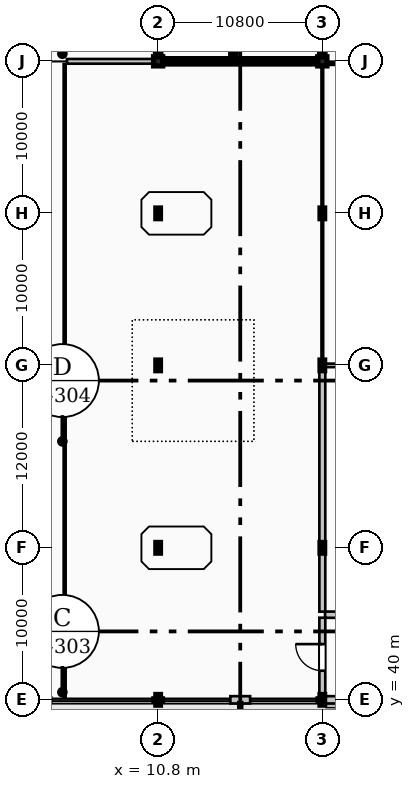
"""IFC4 building model, lengths in metres.
Left out: names, types, materials, properties, quantities, classifications, styles, units other than length and angle.
Written with IfcOpenShell. Run it as: python <this file> out.ifc"""

import sys

from ifc_helpers import new_model, si_unit, direction, frame, frame_2d, origin, origin_2d, place, context, subcontext, project, spatial, rectangle, i_section, extrude, element, fill, save


model = new_model("IFC4")
c1 = context("Model", 3, precision=1e-05, world=origin(), true_north=direction((0.0, 1.0)))
c2 = subcontext(c1, "Body", "Model", "MODEL_VIEW")
j1 = project(units=[si_unit("LENGTHUNIT", "METRE"), si_unit("PLANEANGLEUNIT", "RADIAN")], contexts=[c1])
p1 = place(None, origin())
s1 = spatial("IfcSite", under=j1, at=p1, CompositionType="ELEMENT")
p2 = place(p1, origin())
s2 = spatial("IfcBuilding", under=s1, at=p2, CompositionType="ELEMENT")
p3 = place(p2, frame((0.0, 0.0, 9.6)))
s3 = spatial("IfcBuildingStorey", under=s2, at=p3, CompositionType="ELEMENT", Elevation=9.6)
for number, where, z_axis, x_axis in (
    (1, (10.8, 40.0, 0.0), (0.0, 0.0, 1.0), (1.0, 0.0, 0.0)),
    (2, (10.8, 50.0, 0.0), (0.0, 0.0, 1.0), (1.0, 0.0, 0.0)),
    (3, (10.8, 62.0, 0.0), (0.0, 0.0, 1.0), (1.0, 0.0, 0.0)),
    (4, (10.8, 72.0, 0.0), (0.0, 0.0, 1.0), (1.0, 0.0, 0.0)),
):
    element("IfcColumn", number, at=place(p3, frame(where, z_axis=z_axis, x_axis=x_axis)), inside=s3, PredefinedType="COLUMN", context=c2, shape_type="SweptSolid", body=[
        extrude(i_section(OverallWidth=0.3, OverallDepth=0.7, WebThickness=0.017, FlangeThickness=0.032, FilletRadius=0.027, at=origin_2d()), origin(), (0.0, 0.0, 1.0), 4.8),
    ])
p4 = place(p3, frame((10.8, 82.0, 0.0), z_axis=(0.0, 0.0, 1.0), x_axis=(1.0, 0.0, 0.0)))
e5 = element("IfcColumn", 5, at=p4, inside=s3, PredefinedType="COLUMN", context=c2, shape_type="SweptSolid", body=[
    extrude(rectangle(XDim=0.6, YDim=0.6, at=origin_2d()), origin(), (0.0, 0.0, 1.0), 4.8),
])
for number, where, z_axis, x_axis in (
    (6, (21.6, 40.0, 0.0), (0.0, 0.0, 1.0), (1.0, 0.0, 0.0)),
    (7, (21.6, 50.0, 0.0), (0.0, 0.0, 1.0), (1.0, 0.0, 0.0)),
    (8, (21.6, 62.0, 0.0), (0.0, 0.0, 1.0), (1.0, 0.0, 0.0)),
    (9, (21.6, 72.0, 0.0), (0.0, 0.0, 1.0), (1.0, 0.0, 0.0)),
):
    element("IfcColumn", number, at=place(p3, frame(where, z_axis=z_axis, x_axis=x_axis)), inside=s3, PredefinedType="COLUMN", context=c2, shape_type="SweptSolid", body=[
        extrude(i_section(OverallWidth=0.3, OverallDepth=0.7, WebThickness=0.017, FlangeThickness=0.032, FilletRadius=0.027, at=origin_2d()), origin(), (0.0, 0.0, 1.0), 4.8),
    ])
p5 = place(p3, frame((21.6, 82.0, 0.0), z_axis=(0.0, 0.0, 1.0), x_axis=(1.0, 0.0, 0.0)))
e10 = element("IfcColumn", 10, at=p5, inside=s3, PredefinedType="COLUMN", context=c2, shape_type="SweptSolid", body=[
    extrude(rectangle(XDim=0.6, YDim=0.6, at=origin_2d()), origin(), (0.0, 0.0, 1.0), 4.8),
])
p6 = place(p3, frame((10.43, 40.0, 0.0), z_axis=(0.0, 0.0, 1.0), x_axis=(1.0, 0.0, 0.0)))
e11 = element("IfcWall", 11, at=p6, inside=s3, PredefinedType="STANDARD", context=c2, shape_type="SweptSolid", body=[
    extrude(rectangle(XDim=0.225, YDim=0.3, at=frame_2d((0.113, 0.0))), origin(), (0.0, 0.0, 1.0), 4.56),
])
p7 = place(p3, frame((15.55, 40.0, 0.0), z_axis=(0.0, 0.0, 1.0), x_axis=(1.0, 0.0, 0.0)))
e12 = element("IfcWall", 12, at=p7, inside=s3, PredefinedType="STANDARD", context=c2, shape_type="SweptSolid", body=[
    extrude(rectangle(XDim=1.3, YDim=0.48, at=frame_2d((0.65, 0.0))), origin(), (0.0, 0.0, 1.0), 3.94),
])
p8 = place(p3, frame((10.945, 40.0, 0.0), z_axis=(0.0, 0.0, 1.0), x_axis=(1.0, 0.0, 0.0)))
e13 = element("IfcWall", 13, at=p8, inside=s3, PredefinedType="STANDARD", context=c2, shape_type="SweptSolid", body=[
    extrude(rectangle(XDim=0.225, YDim=0.3, at=frame_2d((0.112, 0.0))), origin(), (0.0, 0.0, 1.0), 4.56),
])
p9 = place(p3, frame((21.23, 40.0, 0.0), z_axis=(0.0, 0.0, 1.0), x_axis=(1.0, 0.0, 0.0)))
e14 = element("IfcWall", 14, at=p9, inside=s3, PredefinedType="STANDARD", context=c2, shape_type="SweptSolid", body=[
    extrude(rectangle(XDim=0.225, YDim=0.3, at=frame_2d((0.113, 0.0))), origin(), (0.0, 0.0, 1.0), 4.56),
])
p10 = place(p3, frame((21.745, 40.0, 0.0), z_axis=(0.0, 0.0, 1.0), x_axis=(1.0, 0.0, 0.0)))
e15 = element("IfcWall", 15, at=p10, inside=s3, PredefinedType="STANDARD", context=c2, shape_type="SweptSolid", body=[
    extrude(rectangle(XDim=10.51, YDim=0.48, at=frame_2d((5.255, 0.0))), origin(), (0.0, 0.0, 1.0), 3.94),
])
p11 = place(p3, frame((11.1, 82.0, 0.0), z_axis=(0.0, 0.0, 1.0), x_axis=(1.0, 0.0, 0.0)))
e16 = element("IfcWall", 16, at=p11, inside=s3, PredefinedType="SHEAR", context=c2, shape_type="SweptSolid", body=[
    extrude(rectangle(XDim=10.2, YDim=0.35, at=frame_2d((5.1, 0.0))), origin(), (0.0, 0.0, 1.0), 4.56),
])
p12 = place(p3, frame((10.8, 82.3, 0.0), z_axis=(0.0, 0.0, 1.0), x_axis=(0.0, 1.0, 0.0)))
e17 = element("IfcWall", 17, at=p12, inside=s3, PredefinedType="SHEAR", context=c2, shape_type="SweptSolid", body=[
    extrude(rectangle(XDim=9.4, YDim=0.35, at=frame_2d((4.7, 0.0))), origin(), (0.0, 0.0, 1.0), 4.56),
])
p13 = place(p3, frame((21.6, 82.3, 0.0), z_axis=(0.0, 0.0, 1.0), x_axis=(0.0, 1.0, 0.0)))
e18 = element("IfcWall", 18, at=p13, inside=s3, PredefinedType="SHEAR", context=c2, shape_type="SweptSolid", body=[
    extrude(rectangle(XDim=9.4, YDim=0.35, at=frame_2d((4.7, 0.0))), origin(), (0.0, 0.0, 1.0), 4.56),
])
p14 = place(p13, frame((0.88, 0.0, 0.0)))
e19 = element("IfcOpeningElement", 19, at=p14, cuts=e18, PredefinedType="OPENING", context=c2, shape_type="SweptSolid", body=[
    extrude(rectangle(XDim=1.8, YDim=2.25, at=frame_2d((0.9, 1.125))), frame((0.0, 0.185, 0.0), z_axis=(0.0, -1.0, 0.0), x_axis=(1.0, 0.0, 0.0)), (0.0, 0.0, 1.0), 0.37),
])
p15 = place(p3, frame((15.75, 82.175, 0.0), z_axis=(0.0, 0.0, 1.0), x_axis=(0.0, 1.0, 0.0)))
e20 = element("IfcWall", 20, at=p15, inside=s3, PredefinedType="SHEAR", context=c2, shape_type="SweptSolid", body=[
    extrude(rectangle(XDim=9.65, YDim=0.35, at=frame_2d((4.825, 0.0))), origin(), (0.0, 0.0, 1.0), 4.56),
])
p16 = place(p15, frame((0.9, 0.0, 0.0)))
e21 = element("IfcOpeningElement", 21, at=p16, cuts=e20, PredefinedType="OPENING", context=c2, shape_type="SweptSolid", body=[
    extrude(rectangle(XDim=1.1, YDim=2.2, at=frame_2d((0.55, 1.1))), frame((0.0, 0.185, 0.0), z_axis=(0.0, -1.0, 0.0), x_axis=(1.0, 0.0, 0.0)), (0.0, 0.0, 1.0), 0.37),
])
p17 = place(p3, frame((21.78, 45.6, 0.0), z_axis=(0.0, 0.0, 1.0), x_axis=(1.0, 0.0, 0.0)))
e22 = element("IfcWall", 22, at=p17, inside=s3, PredefinedType="PARTITIONING", context=c2, shape_type="SweptSolid", body=[
    extrude(rectangle(XDim=11.22, YDim=0.41, at=frame_2d((5.61, 0.0))), origin(), (0.0, 0.0, 1.0), 4.52),
])
p18 = place(p17, frame((5.1, 0.0, 0.0)))
e23 = element("IfcOpeningElement", 23, at=p18, cuts=e22, PredefinedType="OPENING", context=c2, shape_type="SweptSolid", body=[
    extrude(rectangle(XDim=1.02, YDim=2.1, at=frame_2d((0.51, 1.05))), frame((0.0, 0.215, 0.0), z_axis=(0.0, -1.0, 0.0), x_axis=(1.0, 0.0, 0.0)), (0.0, 0.0, 1.0), 0.43),
])
p19 = place(p3, frame((21.78, 81.85, 0.0), z_axis=(0.0, 0.0, 1.0), x_axis=(1.0, 0.0, 0.0)))
e24 = element("IfcWall", 24, at=p19, inside=s3, PredefinedType="PARTITIONING", context=c2, shape_type="SweptSolid", body=[
    extrude(rectangle(XDim=10.42, YDim=0.17, at=frame_2d((5.21, 0.0))), origin(), (0.0, 0.0, 1.0), 3.94),
])
p20 = place(p3, frame((21.6, 40.18, 0.0), z_axis=(0.0, 0.0, 1.0), x_axis=(0.0, 1.0, 0.0)))
e25 = element("IfcWall", 25, at=p20, inside=s3, PredefinedType="PARTITIONING", context=c2, shape_type="SweptSolid", body=[
    extrude(rectangle(XDim=5.22, YDim=0.39, at=frame_2d((2.61, 0.0))), origin(), (0.0, 0.0, 1.0), 4.039),
])
p21 = place(p20, frame((1.735, 0.0, 0.0)))
e26 = element("IfcOpeningElement", 26, at=p21, cuts=e25, PredefinedType="OPENING", context=c2, shape_type="SweptSolid", body=[
    extrude(rectangle(XDim=1.75, YDim=2.45, at=frame_2d((0.875, 1.225))), frame((0.0, 0.205, 0.0), z_axis=(0.0, -1.0, 0.0), x_axis=(1.0, 0.0, 0.0)), (0.0, 0.0, 1.0), 0.41),
])
p22 = place(p3, frame((21.78, 62.0, 0.0), z_axis=(0.0, 0.0, 1.0), x_axis=(1.0, 0.0, 0.0)))
e27 = element("IfcWall", 27, at=p22, inside=s3, PredefinedType="PARTITIONING", context=c2, shape_type="SweptSolid", body=[
    extrude(rectangle(XDim=10.42, YDim=0.23, at=frame_2d((5.21, 0.0))), origin(), (0.0, 0.0, 1.0), 3.94),
])
p23 = place(p3, frame((4.8, 82.0, 0.0), z_axis=(0.0, 0.0, 1.0), x_axis=(1.0, 0.0, 0.0)))
e28 = element("IfcWall", 28, at=p23, inside=s3, PredefinedType="PARTITIONING", context=c2, shape_type="SweptSolid", body=[
    extrude(rectangle(XDim=5.82, YDim=0.31, at=frame_2d((2.91, 0.0))), origin(), (0.0, 0.0, 1.0), 3.94),
])
p24 = place(p3, frame((21.6, 45.8, 0.0), z_axis=(0.0, 0.0, 1.0), x_axis=(0.0, 1.0, 0.0)))
e29 = element("IfcWall", 29, at=p24, inside=s3, PredefinedType="PARTITIONING", context=c2, shape_type="SweptSolid", body=[
    extrude(rectangle(XDim=4.0, YDim=0.39, at=frame_2d((2.0, 0.0))), origin(), (0.0, 0.0, 1.0), 4.039),
])
p25 = place(p3, frame((21.6, 50.2, 0.0), z_axis=(0.0, 0.0, 1.0), x_axis=(0.0, 1.0, 0.0)))
e30 = element("IfcWall", 30, at=p25, inside=s3, PredefinedType="PARTITIONING", context=c2, shape_type="SweptSolid", body=[
    extrude(rectangle(XDim=11.62, YDim=0.39, at=frame_2d((5.81, 0.0))), origin(), (0.0, 0.0, 1.0), 3.94),
])
for number, where, z_axis, x_axis in (
    (31, (21.6, 62.18, 0.0), (0.0, 0.0, 1.0), (0.0, 1.0, 0.0)),
    (32, (21.6, 72.2, 0.0), (0.0, 0.0, 1.0), (0.0, 1.0, 0.0)),
):
    element("IfcWall", number, at=place(p3, frame(where, z_axis=z_axis, x_axis=x_axis)), inside=s3, PredefinedType="PARTITIONING", context=c2, shape_type="SweptSolid", body=[
        extrude(rectangle(XDim=9.62, YDim=0.11, at=frame_2d((4.81, 0.0))), origin(), (0.0, 0.0, 1.0), 4.039),
    ])
p26 = place(p3, frame((4.65, 40.18, 0.0), z_axis=(0.0, 0.0, 1.0), x_axis=(0.0, 1.0, 0.0)))
e33 = element("IfcWall", 33, at=p26, inside=s3, PredefinedType="PARTITIONING", context=c2, shape_type="SweptSolid", body=[
    extrude(rectangle(XDim=41.64, YDim=0.13, at=frame_2d((20.82, 0.0))), origin(), (0.0, 0.0, 1.0), 4.52),
])
p27 = place(p21, origin())
e34 = element("IfcDoor", 34, at=p27, inside=s3, OperationType="SINGLE_SWING_RIGHT", PredefinedType="DOOR", context=c2, shape_type="SweptSolid", body=[
    extrude(rectangle(XDim=1.75, YDim=2.45, at=frame_2d((0.875, 1.225))), frame((0.0, 0.025, 0.0), z_axis=(0.0, -1.0, 0.0), x_axis=(1.0, 0.0, 0.0)), (0.0, 0.0, 1.0), 0.05),
])
fill(e26, e34)
save(model, sys.argv[1])
